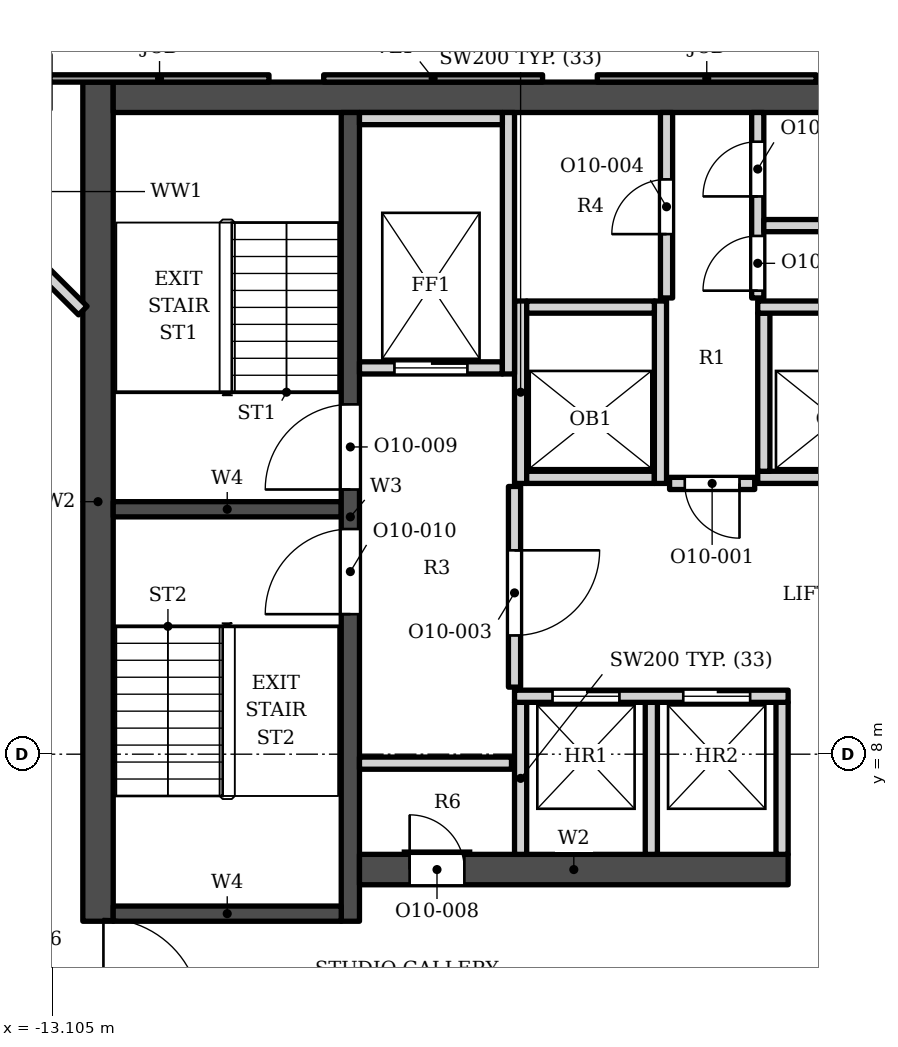
"""IFC4 building model, lengths in metres.
Left out: names, types, materials, properties, quantities, classifications, styles, units other than length and angle.
Written with IfcOpenShell. Run it as: python <this file> out.ifc"""

import sys

from ifc_helpers import new_model, si_unit, direction, frame, frame_2d, origin, place, context, subcontext, project, spatial, polyline, rectangle, outline, extrude, element, fill, save


model = new_model("IFC4")
c1 = context("Model", 3, precision=1e-05, world=origin(), true_north=direction((0.0, 1.0)))
c2 = subcontext(c1, "Body", "Model", "MODEL_VIEW")
j1 = project(units=[si_unit("LENGTHUNIT", "METRE"), si_unit("PLANEANGLEUNIT", "RADIAN")], contexts=[c1])
p1 = place(None, origin())
s1 = spatial("IfcSite", under=j1, at=p1, CompositionType="ELEMENT")
p2 = place(p1, origin())
s2 = spatial("IfcBuilding", under=s1, at=p2, CompositionType="ELEMENT")
p3 = place(p2, frame((0.0, 0.0, 259.9)))
s3 = spatial("IfcBuildingStorey", under=s2, at=p3, CompositionType="ELEMENT", Elevation=259.9)
p4 = place(p3, frame((-12.1, 18.802, 0.0), z_axis=(0.0, 0.0, 1.0), x_axis=(1.0, 0.0, 0.0)))
e1 = element("IfcWall", 1, at=p4, inside=s3, PredefinedType="SHEAR", context=c2, shape_type="SweptSolid", body=[
    extrude(rectangle(XDim=24.2, YDim=0.5, at=frame_2d((12.1, 0.0))), origin(), (0.0, 0.0, 1.0), 3.9),
])
p5 = place(p3, frame((-12.35, 5.253, 0.0), z_axis=(0.0, 0.0, 1.0), x_axis=(0.0, 1.0, 0.0)))
e2 = element("IfcWall", 2, at=p5, inside=s3, PredefinedType="SHEAR", context=c2, shape_type="SweptSolid", body=[
    extrude(rectangle(XDim=13.8, YDim=0.5, at=frame_2d((6.9, 0.0))), origin(), (0.0, 0.0, 1.0), 3.9),
])
p6 = place(p3, frame((-8.2, 5.253, 0.0), z_axis=(0.0, 0.0, 1.0), x_axis=(0.0, 1.0, 0.0)))
e3 = element("IfcWall", 3, at=p6, inside=s3, PredefinedType="SHEAR", context=c2, shape_type="SweptSolid", body=[
    extrude(rectangle(XDim=13.3, YDim=0.3, at=frame_2d((6.65, 0.0))), origin(), (0.0, 0.0, 1.0), 3.9),
])
p7 = place(p6, frame((7.1, 0.0, 0.0)))
e4 = element("IfcOpeningElement", 4, at=p7, cuts=e3, PredefinedType="OPENING", context=c2, shape_type="SweptSolid", body=[
    extrude(rectangle(XDim=1.4, YDim=2.1, at=frame_2d((0.7, 1.05))), frame((0.0, 0.16, 0.0), z_axis=(0.0, -1.0, 0.0), x_axis=(1.0, 0.0, 0.0)), (0.0, 0.0, 1.0), 0.32),
])
p8 = place(p6, frame((5.05, 0.0, 0.0)))
e5 = element("IfcOpeningElement", 5, at=p8, cuts=e3, PredefinedType="OPENING", context=c2, shape_type="SweptSolid", body=[
    extrude(rectangle(XDim=1.4, YDim=2.1, at=frame_2d((0.7, 1.05))), frame((0.0, 0.16, 0.0), z_axis=(0.0, -1.0, 0.0), x_axis=(1.0, 0.0, 0.0)), (0.0, 0.0, 1.0), 0.32),
])
for number, where, z_axis, x_axis in (
    (6, (-12.1, 12.028, 0.0), (0.0, 0.0, 1.0), (1.0, 0.0, 0.0)),
    (7, (-12.1, 5.378, 0.0), (0.0, 0.0, 1.0), (1.0, 0.0, 0.0)),
):
    element("IfcWall", number, at=place(p3, frame(where, z_axis=z_axis, x_axis=x_axis)), inside=s3, PredefinedType="SHEAR", context=c2, shape_type="SweptSolid", body=[
        extrude(rectangle(XDim=3.75, YDim=0.25, at=frame_2d((1.875, 0.0))), origin(), (0.0, 0.0, 1.0), 3.9),
    ])
p9 = place(p3, frame((-8.05, 6.103, 0.0), z_axis=(0.0, 0.0, 1.0), x_axis=(1.0, 0.0, 0.0)))
e8 = element("IfcWall", 8, at=p9, inside=s3, PredefinedType="SHEAR", context=c2, shape_type="SweptSolid", body=[
    extrude(rectangle(XDim=7.05, YDim=0.5, at=frame_2d((3.525, 0.0))), origin(), (0.0, 0.0, 1.0), 3.9),
])
p10 = place(p9, frame((0.825, 0.0, 0.0)))
e9 = element("IfcOpeningElement", 9, at=p10, cuts=e8, PredefinedType="OPENING", context=c2, shape_type="SweptSolid", body=[
    extrude(rectangle(XDim=0.9, YDim=2.1, at=frame_2d((0.45, 1.05))), frame((0.0, 0.26, 0.0), z_axis=(0.0, -1.0, 0.0), x_axis=(1.0, 0.0, 0.0)), (0.0, 0.0, 1.0), 0.52),
])
p11 = place(p3, origin())
e10 = element("IfcWall", 10, at=p11, inside=s3, PredefinedType="SOLIDWALL", context=c2, shape_type="SweptSolid", body=[
    extrude(outline(polyline([(-4.138, 19.173), (-4.138, 19.052), (-0.539, 19.052), (-0.539, 19.173), (-4.138, 19.173)])), origin(), (0.0, 0.0, 1.0), 3.0),
])
p12 = place(p3, origin())
e11 = element("IfcWall", 11, at=p12, inside=s3, PredefinedType="ELEMENTEDWALL", context=c2, shape_type="SweptSolid", body=[
    extrude(outline(polyline([(-8.638, 19.173), (-8.638, 19.052), (-5.039, 19.052), (-5.039, 19.173), (-8.638, 19.173)])), origin(), (0.0, 0.0, 1.0), 3.0),
])
p13 = place(p3, origin())
e12 = element("IfcWall", 12, at=p13, inside=s3, PredefinedType="SOLIDWALL", context=c2, shape_type="SweptSolid", body=[
    extrude(outline(polyline([(-13.138, 19.173), (-13.138, 19.052), (-9.539, 19.052), (-9.539, 19.173), (-13.138, 19.173)])), origin(), (0.0, 0.0, 1.0), 3.0),
])
for number, where, z_axis, x_axis in (
    (13, (-5.4, 6.353, 0.0), (0.0, 0.0, 1.0), (0.0, 1.0, 0.0)),
    (14, (-3.25, 6.353, 0.0), (0.0, 0.0, 1.0), (0.0, 1.0, 0.0)),
    (15, (-1.1, 6.353, 0.0), (0.0, 0.0, 1.0), (0.0, 1.0, 0.0)),
    (16, (-8.05, 7.853, 0.0), (0.0, 0.0, 1.0), (1.0, 0.0, 0.0)),
):
    element("IfcWall", number, at=place(p3, frame(where, z_axis=z_axis, x_axis=x_axis)), inside=s3, PredefinedType="SOLIDWALL", context=c2, shape_type="SweptSolid", body=[
        extrude(rectangle(XDim=2.5, YDim=0.2, at=frame_2d((1.25, 0.0))), origin(), (0.0, 0.0, 1.0), 3.73),
    ])
p14 = place(p3, frame((-5.5, 8.953, 0.0), z_axis=(0.0, 0.0, 1.0), x_axis=(1.0, 0.0, 0.0)))
e17 = element("IfcWall", 17, at=p14, inside=s3, PredefinedType="SOLIDWALL", context=c2, shape_type="SweptSolid", body=[
    extrude(rectangle(XDim=4.5, YDim=0.2, at=frame_2d((2.25, 0.0))), origin(), (0.0, 0.0, 1.0), 3.73),
])
p15 = place(p14, frame((0.625, 0.0, 0.0)))
e18 = element("IfcOpeningElement", 18, at=p15, cuts=e17, PredefinedType="OPENING", context=c2, shape_type="SweptSolid", body=[
    extrude(rectangle(XDim=1.1, YDim=2.1, at=frame_2d((0.55, 1.05))), frame((0.0, 0.11, 0.0), z_axis=(0.0, -1.0, 0.0), x_axis=(1.0, 0.0, 0.0)), (0.0, 0.0, 1.0), 0.22),
])
p16 = place(p14, frame((2.775, 0.0, 0.0)))
e19 = element("IfcOpeningElement", 19, at=p16, cuts=e17, PredefinedType="OPENING", context=c2, shape_type="SweptSolid", body=[
    extrude(rectangle(XDim=1.1, YDim=2.1, at=frame_2d((0.55, 1.05))), frame((0.0, 0.11, 0.0), z_axis=(0.0, -1.0, 0.0), x_axis=(1.0, 0.0, 0.0)), (0.0, 0.0, 1.0), 0.22),
])
p17 = place(p3, frame((-5.5, 9.103, 0.0), z_axis=(0.0, 0.0, 1.0), x_axis=(0.0, 1.0, 0.0)))
e20 = element("IfcWall", 20, at=p17, inside=s3, PredefinedType="SOLIDWALL", context=c2, shape_type="SweptSolid", body=[
    extrude(rectangle(XDim=3.3, YDim=0.2, at=frame_2d((1.65, 0.0))), origin(), (0.0, 0.0, 1.0), 3.73),
])
p18 = place(p17, frame((0.85, 0.0, 0.0)))
e21 = element("IfcOpeningElement", 21, at=p18, cuts=e20, PredefinedType="OPENING", context=c2, shape_type="SweptSolid", body=[
    extrude(rectangle(XDim=1.4, YDim=2.1, at=frame_2d((0.7, 1.05))), frame((0.0, 0.11, 0.0), z_axis=(0.0, -1.0, 0.0), x_axis=(1.0, 0.0, 0.0)), (0.0, 0.0, 1.0), 0.22),
])
p19 = place(p3, frame((-2.95, 12.453, 0.0), z_axis=(0.0, 0.0, 1.0), x_axis=(1.0, 0.0, 0.0)))
e22 = element("IfcWall", 22, at=p19, inside=s3, PredefinedType="SOLIDWALL", context=c2, shape_type="SweptSolid", body=[
    extrude(rectangle(XDim=1.4, YDim=0.2, at=frame_2d((0.7, 0.0))), origin(), (0.0, 0.0, 1.0), 3.73),
])
p20 = place(p19, frame((0.25, 0.0, 0.0)))
e23 = element("IfcOpeningElement", 23, at=p20, cuts=e22, PredefinedType="OPENING", context=c2, shape_type="SweptSolid", body=[
    extrude(rectangle(XDim=0.9, YDim=2.1, at=frame_2d((0.45, 1.05))), frame((0.0, 0.11, 0.0), z_axis=(0.0, -1.0, 0.0), x_axis=(1.0, 0.0, 0.0)), (0.0, 0.0, 1.0), 0.22),
])
p21 = place(p3, frame((-5.4, 12.453, 0.0), z_axis=(0.0, 0.0, 1.0), x_axis=(0.0, 1.0, 0.0)))
e24 = element("IfcWall", 24, at=p21, inside=s3, PredefinedType="SOLIDWALL", context=c2, shape_type="SweptSolid", body=[
    extrude(rectangle(XDim=3.0, YDim=0.2, at=frame_2d((1.5, 0.0))), origin(), (0.0, 0.0, 1.0), 3.73),
])
p22 = place(p3, frame((-5.3, 12.552, 0.0), z_axis=(0.0, 0.0, 1.0), x_axis=(1.0, 0.0, 0.0)))
e25 = element("IfcWall", 25, at=p22, inside=s3, PredefinedType="SOLIDWALL", context=c2, shape_type="SweptSolid", body=[
    extrude(rectangle(XDim=2.1, YDim=0.2, at=frame_2d((1.05, 0.0))), origin(), (0.0, 0.0, 1.0), 3.73),
])
p23 = place(p3, frame((-3.1, 12.453, 0.0), z_axis=(0.0, 0.0, 1.0), x_axis=(0.0, 1.0, 0.0)))
e26 = element("IfcWall", 26, at=p23, inside=s3, PredefinedType="SOLIDWALL", context=c2, shape_type="SweptSolid", body=[
    extrude(rectangle(XDim=3.0, YDim=0.2, at=frame_2d((1.5, 0.0))), origin(), (0.0, 0.0, 1.0), 3.73),
])
p24 = place(p3, frame((-1.5, 12.552, 0.0), z_axis=(0.0, 0.0, 1.0), x_axis=(1.0, 0.0, 0.0)))
e27 = element("IfcWall", 27, at=p24, inside=s3, PredefinedType="SOLIDWALL", context=c2, shape_type="SweptSolid", body=[
    extrude(rectangle(XDim=7.0, YDim=0.2, at=frame_2d((3.5, 0.0))), origin(), (0.0, 0.0, 1.0), 3.73),
])
p25 = place(p24, frame((3.075, 0.0, 0.0)))
e28 = element("IfcOpeningElement", 28, at=p25, cuts=e27, PredefinedType="OPENING", context=c2, shape_type="SweptSolid", body=[
    extrude(rectangle(XDim=1.1, YDim=2.1, at=frame_2d((0.55, 1.05))), frame((0.0, 0.11, 0.0), z_axis=(0.0, -1.0, 0.0), x_axis=(1.0, 0.0, 0.0)), (0.0, 0.0, 1.0), 0.22),
])
p26 = place(p24, frame((5.275, 0.0, 0.0)))
e29 = element("IfcOpeningElement", 29, at=p26, cuts=e27, PredefinedType="OPENING", context=c2, shape_type="SweptSolid", body=[
    extrude(rectangle(XDim=1.1, YDim=2.1, at=frame_2d((0.55, 1.05))), frame((0.0, 0.11, 0.0), z_axis=(0.0, -1.0, 0.0), x_axis=(1.0, 0.0, 0.0)), (0.0, 0.0, 1.0), 0.22),
])
p27 = place(p3, frame((-1.4, 12.653, 0.0), z_axis=(0.0, 0.0, 1.0), x_axis=(0.0, 1.0, 0.0)))
e30 = element("IfcWall", 30, at=p27, inside=s3, PredefinedType="SOLIDWALL", context=c2, shape_type="SweptSolid", body=[
    extrude(rectangle(XDim=2.6, YDim=0.2, at=frame_2d((1.3, 0.0))), origin(), (0.0, 0.0, 1.0), 3.73),
])
p28 = place(p3, frame((-8.05, 14.353, 0.0), z_axis=(0.0, 0.0, 1.0), x_axis=(1.0, 0.0, 0.0)))
e31 = element("IfcWall", 31, at=p28, inside=s3, PredefinedType="SOLIDWALL", context=c2, shape_type="SweptSolid", body=[
    extrude(rectangle(XDim=2.35, YDim=0.2, at=frame_2d((1.175, 0.0))), origin(), (0.0, 0.0, 1.0), 3.73),
])
p29 = place(p28, frame((0.575, 0.0, 0.0)))
e32 = element("IfcOpeningElement", 32, at=p29, cuts=e31, PredefinedType="OPENING", context=c2, shape_type="SweptSolid", body=[
    extrude(rectangle(XDim=1.2, YDim=2.1, at=frame_2d((0.6, 1.05))), frame((0.0, 0.11, 0.0), z_axis=(0.0, -1.0, 0.0), x_axis=(1.0, 0.0, 0.0)), (0.0, 0.0, 1.0), 0.22),
])
p30 = place(p3, frame((-5.6, 14.253, 0.0), z_axis=(0.0, 0.0, 1.0), x_axis=(0.0, 1.0, 0.0)))
e33 = element("IfcWall", 33, at=p30, inside=s3, PredefinedType="SOLIDWALL", context=c2, shape_type="SweptSolid", body=[
    extrude(rectangle(XDim=4.3, YDim=0.2, at=frame_2d((2.15, 0.0))), origin(), (0.0, 0.0, 1.0), 3.73),
])
p31 = place(p3, frame((-5.3, 15.353, 0.0), z_axis=(0.0, 0.0, 1.0), x_axis=(1.0, 0.0, 0.0)))
e34 = element("IfcWall", 34, at=p31, inside=s3, PredefinedType="SOLIDWALL", context=c2, shape_type="SweptSolid", body=[
    extrude(rectangle(XDim=2.1, YDim=0.2, at=frame_2d((1.05, 0.0))), origin(), (0.0, 0.0, 1.0), 3.73),
])
p32 = place(p3, frame((-1.5, 15.353, 0.0), z_axis=(0.0, 0.0, 1.0), x_axis=(1.0, 0.0, 0.0)))
e35 = element("IfcWall", 35, at=p32, inside=s3, PredefinedType="SOLIDWALL", context=c2, shape_type="SweptSolid", body=[
    extrude(rectangle(XDim=7.2, YDim=0.2, at=frame_2d((3.6, 0.0))), origin(), (0.0, 0.0, 1.0), 3.73),
])
p33 = place(p3, frame((-3.0, 15.503, 0.0), z_axis=(0.0, 0.0, 1.0), x_axis=(0.0, 1.0, 0.0)))
e36 = element("IfcWall", 36, at=p33, inside=s3, PredefinedType="SOLIDWALL", context=c2, shape_type="SweptSolid", body=[
    extrude(rectangle(XDim=3.05, YDim=0.2, at=frame_2d((1.525, 0.0))), origin(), (0.0, 0.0, 1.0), 3.73),
])
p34 = place(p33, frame((1.05, 0.0, 0.0)))
e37 = element("IfcOpeningElement", 37, at=p34, cuts=e36, PredefinedType="OPENING", context=c2, shape_type="SweptSolid", body=[
    extrude(rectangle(XDim=0.9, YDim=2.1, at=frame_2d((0.45, 1.05))), frame((0.0, 0.11, 0.0), z_axis=(0.0, -1.0, 0.0), x_axis=(1.0, 0.0, 0.0)), (0.0, 0.0, 1.0), 0.22),
])
p35 = place(p3, frame((-1.5, 15.503, 0.0), z_axis=(0.0, 0.0, 1.0), x_axis=(0.0, 1.0, 0.0)))
e38 = element("IfcWall", 38, at=p35, inside=s3, PredefinedType="SOLIDWALL", context=c2, shape_type="SweptSolid", body=[
    extrude(rectangle(XDim=3.05, YDim=0.2, at=frame_2d((1.525, 0.0))), origin(), (0.0, 0.0, 1.0), 3.73),
])
p36 = place(p35, frame((0.12, 0.0, 0.0)))
e39 = element("IfcOpeningElement", 39, at=p36, cuts=e38, PredefinedType="OPENING", context=c2, shape_type="SweptSolid", body=[
    extrude(rectangle(XDim=0.9, YDim=2.1, at=frame_2d((0.45, 1.05))), frame((0.0, 0.11, 0.0), z_axis=(0.0, -1.0, 0.0), x_axis=(1.0, 0.0, 0.0)), (0.0, 0.0, 1.0), 0.22),
])
p37 = place(p35, frame((1.67, 0.0, 0.0)))
e40 = element("IfcOpeningElement", 40, at=p37, cuts=e38, PredefinedType="OPENING", context=c2, shape_type="SweptSolid", body=[
    extrude(rectangle(XDim=0.9, YDim=2.1, at=frame_2d((0.45, 1.05))), frame((0.0, 0.11, 0.0), z_axis=(0.0, -1.0, 0.0), x_axis=(1.0, 0.0, 0.0)), (0.0, 0.0, 1.0), 0.22),
])
p38 = place(p3, frame((-1.4, 16.693, 0.0), z_axis=(0.0, 0.0, 1.0), x_axis=(1.0, 0.0, 0.0)))
e41 = element("IfcWall", 41, at=p38, inside=s3, PredefinedType="SOLIDWALL", context=c2, shape_type="SweptSolid", body=[
    extrude(rectangle(XDim=6.85, YDim=0.2, at=frame_2d((3.425, 0.0))), origin(), (0.0, 0.0, 1.0), 3.73),
])
p39 = place(p3, frame((-8.05, 18.453, 0.0), z_axis=(0.0, 0.0, 1.0), x_axis=(1.0, 0.0, 0.0)))
e42 = element("IfcWall", 42, at=p39, inside=s3, PredefinedType="SOLIDWALL", context=c2, shape_type="SweptSolid", body=[
    extrude(rectangle(XDim=2.35, YDim=0.2, at=frame_2d((1.175, 0.0))), origin(), (0.0, 0.0, 1.0), 3.73),
])
p40 = place(p3, frame((-13.26, 15.953, 0.0), z_axis=(0.0, 0.0, 1.0), x_axis=(0.708285399161, -0.705926195389, 0.0)))
e43 = element("IfcWall", 43, at=p40, inside=s3, PredefinedType="PARTITIONING", context=c2, shape_type="SweptSolid", body=[
    extrude(rectangle(XDim=0.931, YDim=0.2, at=frame_2d((0.466, 0.0))), origin(), (0.0, 0.0, 1.0), 3.73),
])
p41 = place(p15, origin())
e44 = element("IfcDoor", 44, at=p41, inside=s3, OperationType="DOUBLE_DOOR_SLIDING", PredefinedType="DOOR", context=c2, shape_type="SweptSolid", body=[
    extrude(rectangle(XDim=1.1, YDim=2.1, at=frame_2d((0.55, 1.05))), frame((0.0, 0.025, 0.0), z_axis=(0.0, -1.0, 0.0), x_axis=(1.0, 0.0, 0.0)), (0.0, 0.0, 1.0), 0.05),
])
fill(e18, e44)
p42 = place(p16, origin())
e45 = element("IfcDoor", 45, at=p42, inside=s3, OperationType="DOUBLE_DOOR_SLIDING", PredefinedType="DOOR", context=c2, shape_type="SweptSolid", body=[
    extrude(rectangle(XDim=1.1, YDim=2.1, at=frame_2d((0.55, 1.05))), frame((0.0, 0.025, 0.0), z_axis=(0.0, -1.0, 0.0), x_axis=(1.0, 0.0, 0.0)), (0.0, 0.0, 1.0), 0.05),
])
fill(e19, e45)
p43 = place(p29, origin())
e46 = element("IfcDoor", 46, at=p43, inside=s3, OperationType="DOUBLE_DOOR_SLIDING", PredefinedType="DOOR", context=c2, shape_type="SweptSolid", body=[
    extrude(rectangle(XDim=1.2, YDim=2.1, at=frame_2d((0.6, 1.05))), frame((0.0, 0.025, 0.0), z_axis=(0.0, -1.0, 0.0), x_axis=(1.0, 0.0, 0.0)), (0.0, 0.0, 1.0), 0.05),
])
fill(e32, e46)
p44 = place(p7, origin())
e47 = element("IfcDoor", 47, at=p44, inside=s3, OperationType="SINGLE_SWING_LEFT", PredefinedType="DOOR", context=c2, shape_type="SweptSolid", body=[
    extrude(rectangle(XDim=1.4, YDim=2.1, at=frame_2d((0.7, 1.05))), frame((0.0, 0.025, 0.0), z_axis=(0.0, -1.0, 0.0), x_axis=(1.0, 0.0, 0.0)), (0.0, 0.0, 1.0), 0.05),
])
fill(e4, e47)
p45 = place(p8, origin())
e48 = element("IfcDoor", 48, at=p45, inside=s3, OperationType="SINGLE_SWING_LEFT", PredefinedType="DOOR", context=c2, shape_type="SweptSolid", body=[
    extrude(rectangle(XDim=1.4, YDim=2.1, at=frame_2d((0.7, 1.05))), frame((0.0, 0.025, 0.0), z_axis=(0.0, -1.0, 0.0), x_axis=(1.0, 0.0, 0.0)), (0.0, 0.0, 1.0), 0.05),
])
fill(e5, e48)
p46 = place(p20, origin())
e49 = element("IfcDoor", 49, at=p46, inside=s3, OperationType="SINGLE_SWING_RIGHT", PredefinedType="DOOR", context=c2, shape_type="SweptSolid", body=[
    extrude(rectangle(XDim=0.9, YDim=2.1, at=frame_2d((0.45, 1.05))), frame((0.0, 0.025, 0.0), z_axis=(0.0, -1.0, 0.0), x_axis=(1.0, 0.0, 0.0)), (0.0, 0.0, 1.0), 0.05),
])
fill(e23, e49)
p47 = place(p18, origin())
e50 = element("IfcDoor", 50, at=p47, inside=s3, OperationType="SINGLE_SWING_RIGHT", PredefinedType="DOOR", context=c2, shape_type="SweptSolid", body=[
    extrude(rectangle(XDim=1.4, YDim=2.1, at=frame_2d((0.7, 1.05))), frame((0.0, 0.025, 0.0), z_axis=(0.0, -1.0, 0.0), x_axis=(1.0, 0.0, 0.0)), (0.0, 0.0, 1.0), 0.05),
])
fill(e21, e50)
p48 = place(p34, origin())
e51 = element("IfcDoor", 51, at=p48, inside=s3, OperationType="SINGLE_SWING_LEFT", PredefinedType="DOOR", context=c2, shape_type="SweptSolid", body=[
    extrude(rectangle(XDim=0.9, YDim=2.1, at=frame_2d((0.45, 1.05))), frame((0.0, 0.025, 0.0), z_axis=(0.0, -1.0, 0.0), x_axis=(1.0, 0.0, 0.0)), (0.0, 0.0, 1.0), 0.05),
])
fill(e37, e51)
p49 = place(p36, origin())
e52 = element("IfcDoor", 52, at=p49, inside=s3, OperationType="SINGLE_SWING_LEFT", PredefinedType="DOOR", context=c2, shape_type="SweptSolid", body=[
    extrude(rectangle(XDim=0.9, YDim=2.1, at=frame_2d((0.45, 1.05))), frame((0.0, 0.025, 0.0), z_axis=(0.0, -1.0, 0.0), x_axis=(1.0, 0.0, 0.0)), (0.0, 0.0, 1.0), 0.05),
])
fill(e39, e52)
p50 = place(p37, origin())
e53 = element("IfcDoor", 53, at=p50, inside=s3, OperationType="SINGLE_SWING_LEFT", PredefinedType="DOOR", context=c2, shape_type="SweptSolid", body=[
    extrude(rectangle(XDim=0.9, YDim=2.1, at=frame_2d((0.45, 1.05))), frame((0.0, 0.025, 0.0), z_axis=(0.0, -1.0, 0.0), x_axis=(1.0, 0.0, 0.0)), (0.0, 0.0, 1.0), 0.05),
])
fill(e40, e53)
p51 = place(p10, origin())
e54 = element("IfcDoor", 54, at=p51, inside=s3, OperationType="SINGLE_SWING_LEFT", PredefinedType="DOOR", context=c2, shape_type="SweptSolid", body=[
    extrude(rectangle(XDim=0.9, YDim=2.1, at=frame_2d((0.45, 1.05))), frame((0.0, 0.025, 0.0), z_axis=(0.0, -1.0, 0.0), x_axis=(1.0, 0.0, 0.0)), (0.0, 0.0, 1.0), 0.05),
])
fill(e9, e54)
save(model, sys.argv[1])
